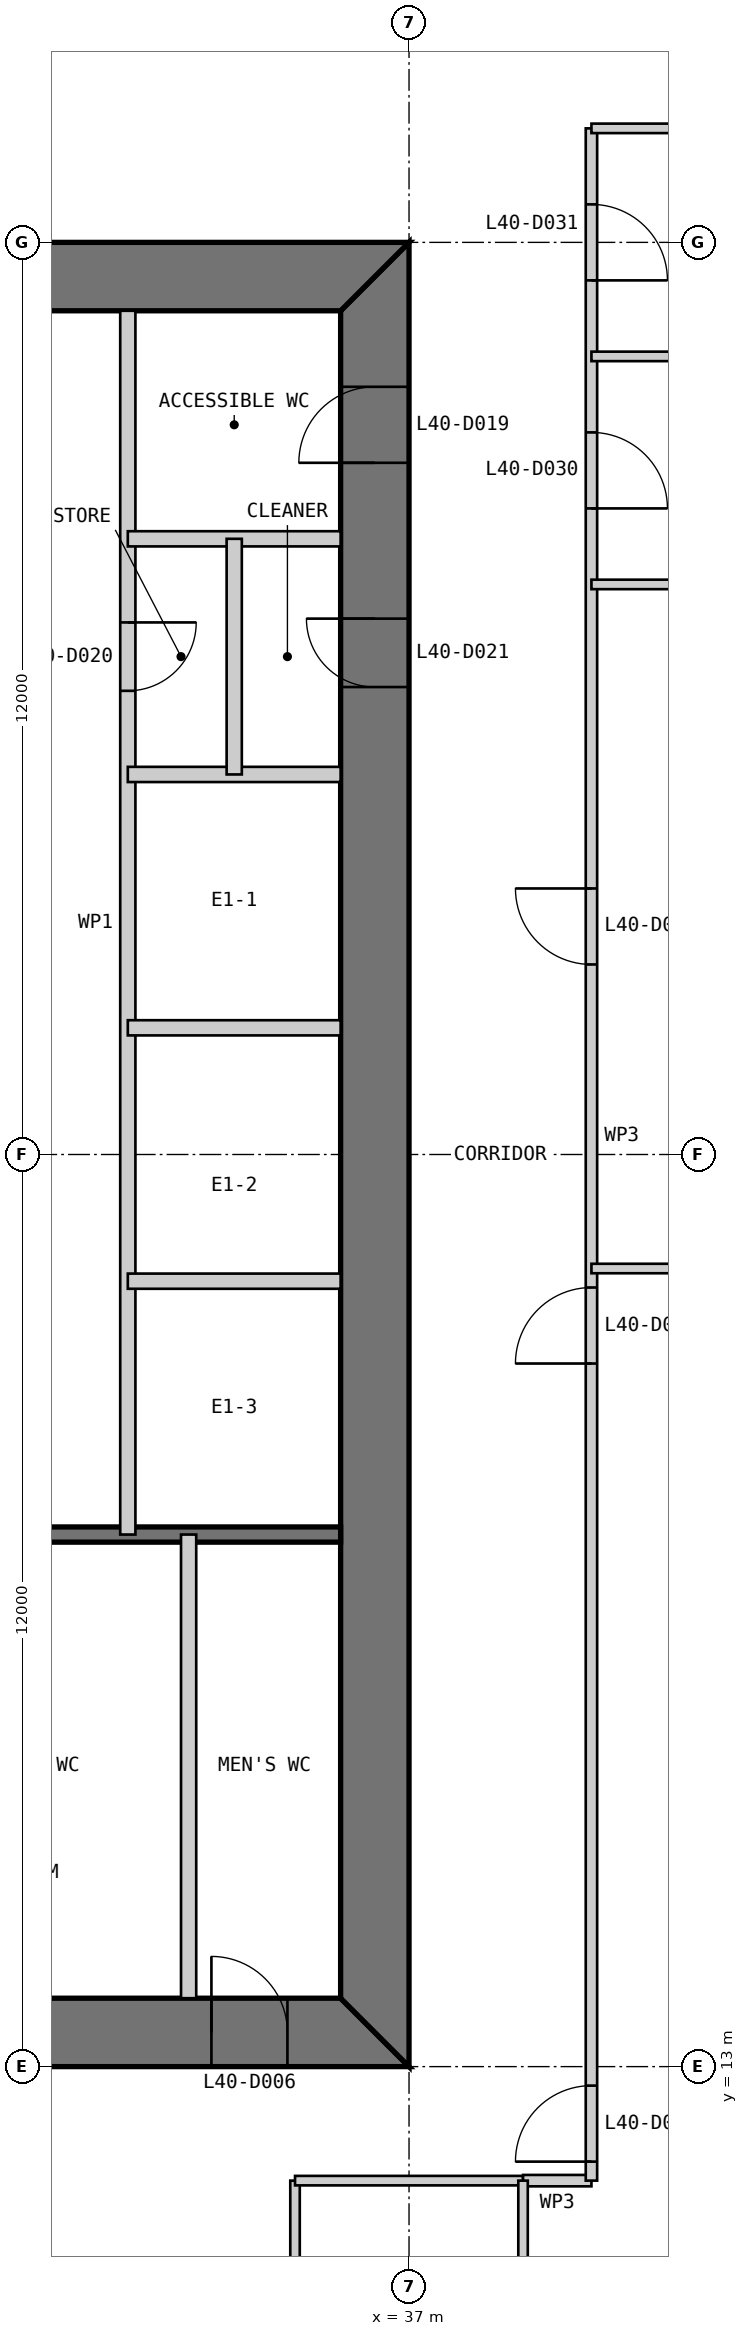
"""IFC4 building model, lengths in metres.
Left out: names, types, materials, properties, quantities, classifications, styles, units other than length and angle.
Written with IfcOpenShell. Run it as: python <this file> out.ifc"""

import sys

from ifc_helpers import new_model, si_unit, direction, frame, frame_2d, origin, place, context, subcontext, project, spatial, polyline, rectangle, outline, extrude, element, fill, save


model = new_model("IFC4")
c1 = context("Model", 3, precision=1e-05, world=origin(), true_north=direction((0.0, 1.0)))
c2 = subcontext(c1, "Body", "Model", "MODEL_VIEW")
j1 = project(units=[si_unit("LENGTHUNIT", "METRE"), si_unit("PLANEANGLEUNIT", "RADIAN")], contexts=[c1])
p1 = place(None, origin())
s1 = spatial("IfcSite", under=j1, at=p1, CompositionType="ELEMENT")
p2 = place(p1, origin())
s2 = spatial("IfcBuilding", under=s1, at=p2, CompositionType="ELEMENT")
p3 = place(p2, frame((0.0, 0.0, 173.8)))
s3 = spatial("IfcBuildingStorey", under=s2, at=p3, CompositionType="ELEMENT", Elevation=173.8)
p4 = place(p3, frame((13.0, 13.45, 0.0), z_axis=(0.0, 0.0, 1.0), x_axis=(1.0, 0.0, 0.0)))
e1 = element("IfcWall", 1, at=p4, inside=s3, PredefinedType="SHEAR", context=c2, shape_type="SweptSolid", body=[
    extrude(outline(polyline([(0.0, -0.45), (24.0, -0.45), (23.1, 0.45), (0.9, 0.45), (0.0, -0.45)])), origin(), (0.0, 0.0, 1.0), 4.0),
])
p5 = place(p4, frame((4.9, 0.0, 0.0)))
e2 = element("IfcOpeningElement", 2, at=p5, cuts=e1, PredefinedType="OPENING", context=c2, shape_type="SweptSolid", body=[
    extrude(rectangle(XDim=1.0, YDim=2.2, at=frame_2d((0.5, 1.1))), frame((0.0, 0.46, 0.0), z_axis=(0.0, -1.0, 0.0), x_axis=(1.0, 0.0, 0.0)), (0.0, 0.0, 1.0), 0.92),
])
p6 = place(p4, frame((8.9, 0.0, 0.0)))
e3 = element("IfcOpeningElement", 3, at=p6, cuts=e1, PredefinedType="OPENING", context=c2, shape_type="SweptSolid", body=[
    extrude(rectangle(XDim=1.1, YDim=2.2, at=frame_2d((0.55, 1.1))), frame((0.0, 0.46, 0.0), z_axis=(0.0, -1.0, 0.0), x_axis=(1.0, 0.0, 0.0)), (0.0, 0.0, 1.0), 0.92),
])
p7 = place(p4, frame((15.05, 0.0, 0.0)))
e4 = element("IfcOpeningElement", 4, at=p7, cuts=e1, PredefinedType="OPENING", context=c2, shape_type="SweptSolid", body=[
    extrude(rectangle(XDim=0.9, YDim=2.2, at=frame_2d((0.45, 1.1))), frame((0.0, 0.46, 0.0), z_axis=(0.0, -1.0, 0.0), x_axis=(1.0, 0.0, 0.0)), (0.0, 0.0, 1.0), 0.92),
])
p8 = place(p4, frame((17.9, 0.0, 0.0)))
e5 = element("IfcOpeningElement", 5, at=p8, cuts=e1, PredefinedType="OPENING", context=c2, shape_type="SweptSolid", body=[
    extrude(rectangle(XDim=1.0, YDim=2.2, at=frame_2d((0.5, 1.1))), frame((0.0, 0.46, 0.0), z_axis=(0.0, -1.0, 0.0), x_axis=(1.0, 0.0, 0.0)), (0.0, 0.0, 1.0), 0.92),
])
p9 = place(p4, frame((21.4, 0.0, 0.0)))
e6 = element("IfcOpeningElement", 6, at=p9, cuts=e1, PredefinedType="OPENING", context=c2, shape_type="SweptSolid", body=[
    extrude(rectangle(XDim=1.0, YDim=2.2, at=frame_2d((0.5, 1.1))), frame((0.0, 0.46, 0.0), z_axis=(0.0, -1.0, 0.0), x_axis=(1.0, 0.0, 0.0)), (0.0, 0.0, 1.0), 0.92),
])
p10 = place(p3, frame((36.55, 13.9, 0.0), z_axis=(0.0, 0.0, 1.0), x_axis=(0.0, 1.0, 0.0)))
e7 = element("IfcWall", 7, at=p10, inside=s3, PredefinedType="SHEAR", context=c2, shape_type="SweptSolid", body=[
    extrude(outline(polyline([(-0.9, -0.45), (23.1, -0.45), (22.2, 0.45), (0.0, 0.45), (-0.9, -0.45)])), origin(), (0.0, 0.0, 1.0), 4.0),
])
p11 = place(p10, frame((20.2, 0.0, 0.0)))
e8 = element("IfcOpeningElement", 8, at=p11, cuts=e7, PredefinedType="OPENING", context=c2, shape_type="SweptSolid", body=[
    extrude(rectangle(XDim=1.0, YDim=2.2, at=frame_2d((0.5, 1.1))), frame((0.0, 0.46, 0.0), z_axis=(0.0, -1.0, 0.0), x_axis=(1.0, 0.0, 0.0)), (0.0, 0.0, 1.0), 0.92),
])
p12 = place(p10, frame((17.25, 0.0, 0.0)))
e9 = element("IfcOpeningElement", 9, at=p12, cuts=e7, PredefinedType="OPENING", context=c2, shape_type="SweptSolid", body=[
    extrude(rectangle(XDim=0.9, YDim=2.2, at=frame_2d((0.45, 1.1))), frame((0.0, 0.46, 0.0), z_axis=(0.0, -1.0, 0.0), x_axis=(1.0, 0.0, 0.0)), (0.0, 0.0, 1.0), 0.92),
])
p13 = place(p3, frame((37.0, 36.55, 0.0), z_axis=(0.0, 0.0, 1.0), x_axis=(-1.0, 0.0, 0.0)))
e10 = element("IfcWall", 10, at=p13, inside=s3, PredefinedType="SHEAR", context=c2, shape_type="SweptSolid", body=[
    extrude(outline(polyline([(0.0, -0.45), (24.0, -0.45), (23.1, 0.45), (0.9, 0.45), (0.0, -0.45)])), origin(), (0.0, 0.0, 1.0), 4.0),
])
p14 = place(p13, frame((4.9, 0.0, 0.0)))
e11 = element("IfcOpeningElement", 11, at=p14, cuts=e10, PredefinedType="OPENING", context=c2, shape_type="SweptSolid", body=[
    extrude(rectangle(XDim=1.0, YDim=2.2, at=frame_2d((0.5, 1.1))), frame((0.0, 0.46, 0.0), z_axis=(0.0, -1.0, 0.0), x_axis=(1.0, 0.0, 0.0)), (0.0, 0.0, 1.0), 0.92),
])
p15 = place(p13, frame((8.9, 0.0, 0.0)))
e12 = element("IfcOpeningElement", 12, at=p15, cuts=e10, PredefinedType="OPENING", context=c2, shape_type="SweptSolid", body=[
    extrude(rectangle(XDim=1.1, YDim=2.2, at=frame_2d((0.55, 1.1))), frame((0.0, 0.46, 0.0), z_axis=(0.0, -1.0, 0.0), x_axis=(1.0, 0.0, 0.0)), (0.0, 0.0, 1.0), 0.92),
])
p16 = place(p13, frame((15.05, 0.0, 0.0)))
e13 = element("IfcOpeningElement", 13, at=p16, cuts=e10, PredefinedType="OPENING", context=c2, shape_type="SweptSolid", body=[
    extrude(rectangle(XDim=0.9, YDim=2.2, at=frame_2d((0.45, 1.1))), frame((0.0, 0.46, 0.0), z_axis=(0.0, -1.0, 0.0), x_axis=(1.0, 0.0, 0.0)), (0.0, 0.0, 1.0), 0.92),
])
p17 = place(p13, frame((17.9, 0.0, 0.0)))
e14 = element("IfcOpeningElement", 14, at=p17, cuts=e10, PredefinedType="OPENING", context=c2, shape_type="SweptSolid", body=[
    extrude(rectangle(XDim=1.0, YDim=2.2, at=frame_2d((0.5, 1.1))), frame((0.0, 0.46, 0.0), z_axis=(0.0, -1.0, 0.0), x_axis=(1.0, 0.0, 0.0)), (0.0, 0.0, 1.0), 0.92),
])
p18 = place(p13, frame((21.4, 0.0, 0.0)))
e15 = element("IfcOpeningElement", 15, at=p18, cuts=e10, PredefinedType="OPENING", context=c2, shape_type="SweptSolid", body=[
    extrude(rectangle(XDim=1.0, YDim=2.2, at=frame_2d((0.5, 1.1))), frame((0.0, 0.46, 0.0), z_axis=(0.0, -1.0, 0.0), x_axis=(1.0, 0.0, 0.0)), (0.0, 0.0, 1.0), 0.92),
])
p19 = place(p3, frame((20.3, 20.0, 0.0), z_axis=(0.0, 0.0, 1.0), x_axis=(1.0, 0.0, 0.0)))
e16 = element("IfcWall", 16, at=p19, inside=s3, PredefinedType="SOLIDWALL", context=c2, shape_type="SweptSolid", body=[
    extrude(rectangle(XDim=15.8, YDim=0.2, at=frame_2d((7.9, 0.0))), origin(), (0.0, 0.0, 1.0), 3.8),
])
p20 = place(p3, frame((34.1, 13.9, 0.0), z_axis=(0.0, 0.0, 1.0), x_axis=(0.0, 1.0, 0.0)))
e17 = element("IfcWall", 17, at=p20, inside=s3, PredefinedType="PARTITIONING", context=c2, shape_type="SweptSolid", body=[
    extrude(rectangle(XDim=6.1, YDim=0.2, at=frame_2d((3.05, 0.0))), origin(), (0.0, 0.0, 1.0), 3.8),
])
p21 = place(p3, frame((33.3, 36.1, 0.0), z_axis=(0.0, 0.0, 1.0), x_axis=(0.0, -1.0, 0.0)))
e18 = element("IfcWall", 18, at=p21, inside=s3, PredefinedType="PARTITIONING", context=c2, shape_type="SweptSolid", body=[
    extrude(rectangle(XDim=16.1, YDim=0.2, at=frame_2d((8.05, 0.0))), origin(), (0.0, 0.0, 1.0), 3.8),
])
p22 = place(p21, frame((4.1, 0.0, 0.0)))
e19 = element("IfcOpeningElement", 19, at=p22, cuts=e18, PredefinedType="OPENING", context=c2, shape_type="SweptSolid", body=[
    extrude(rectangle(XDim=0.9, YDim=2.2, at=frame_2d((0.45, 1.1))), frame((0.0, 0.11, 0.0), z_axis=(0.0, -1.0, 0.0), x_axis=(1.0, 0.0, 0.0)), (0.0, 0.0, 1.0), 0.22),
])
for number, where, z_axis, x_axis in (
    (20, (36.1, 30.0, 0.0), (0.0, 0.0, 1.0), (-1.0, 0.0, 0.0)),
    (21, (36.1, 26.667, 0.0), (0.0, 0.0, 1.0), (-1.0, 0.0, 0.0)),
    (22, (36.1, 23.333, 0.0), (0.0, 0.0, 1.0), (-1.0, 0.0, 0.0)),
    (23, (36.1, 33.1, 0.0), (0.0, 0.0, 1.0), (-1.0, 0.0, 0.0)),
):
    element("IfcWall", number, at=place(p3, frame(where, z_axis=z_axis, x_axis=x_axis)), inside=s3, PredefinedType="PARTITIONING", context=c2, shape_type="SweptSolid", body=[
        extrude(rectangle(XDim=2.8, YDim=0.2, at=frame_2d((1.4, 0.0))), origin(), (0.0, 0.0, 1.0), 3.8),
    ])
p23 = place(p3, frame((34.7, 33.1, 0.0), z_axis=(0.0, 0.0, 1.0), x_axis=(0.0, -1.0, 0.0)))
e24 = element("IfcWall", 24, at=p23, inside=s3, PredefinedType="PARTITIONING", context=c2, shape_type="SweptSolid", body=[
    extrude(rectangle(XDim=3.1, YDim=0.2, at=frame_2d((1.55, 0.0))), origin(), (0.0, 0.0, 1.0), 3.8),
])
p24 = place(p3, frame((35.5, 4.0, 0.0), z_axis=(0.0, 0.0, 1.0), x_axis=(0.0, 1.0, 0.0)))
e25 = element("IfcWall", 25, at=p24, inside=s3, PredefinedType="PARTITIONING", context=c2, shape_type="SweptSolid", body=[
    extrude(rectangle(XDim=7.5, YDim=0.125, at=frame_2d((3.75, 0.0))), origin(), (0.0, 0.0, 1.0), 3.85),
])
p25 = place(p24, frame((3.3, 0.0, 0.0)))
e26 = element("IfcOpeningElement", 26, at=p25, cuts=e25, PredefinedType="OPENING", context=c2, shape_type="SweptSolid", body=[
    extrude(rectangle(XDim=0.9, YDim=2.2, at=frame_2d((0.45, 1.1))), frame((0.0, 0.073, 0.0), z_axis=(0.0, -1.0, 0.0), x_axis=(1.0, 0.0, 0.0)), (0.0, 0.0, 1.0), 0.145),
])
p26 = place(p3, frame((35.5, 11.5, 0.0), z_axis=(0.0, 0.0, 1.0), x_axis=(1.0, 0.0, 0.0)))
e27 = element("IfcWall", 27, at=p26, inside=s3, PredefinedType="PARTITIONING", context=c2, shape_type="SweptSolid", body=[
    extrude(rectangle(XDim=3.0, YDim=0.125, at=frame_2d((1.5, 0.0))), origin(), (0.0, 0.0, 1.0), 3.85),
])
p27 = place(p3, frame((38.5, 11.5, 0.0), z_axis=(0.0, 0.0, 1.0), x_axis=(1.0, 0.0, 0.0)))
e28 = element("IfcWall", 28, at=p27, inside=s3, PredefinedType="PARTITIONING", context=c2, shape_type="SweptSolid", body=[
    extrude(rectangle(XDim=0.9, YDim=0.15, at=frame_2d((0.45, 0.0))), origin(), (0.0, 0.0, 1.0), 3.85),
])
p28 = place(p3, frame((39.4, 11.5, 0.0), z_axis=(0.0, 0.0, 1.0), x_axis=(0.0, 1.0, 0.0)))
e29 = element("IfcWall", 29, at=p28, inside=s3, PredefinedType="PARTITIONING", context=c2, shape_type="SweptSolid", body=[
    extrude(rectangle(XDim=27.0, YDim=0.15, at=frame_2d((13.5, 0.0))), origin(), (0.0, 0.0, 1.0), 3.85),
])
p29 = place(p28, frame((16.0, 0.0, 0.0)))
e30 = element("IfcOpeningElement", 30, at=p29, cuts=e29, PredefinedType="OPENING", context=c2, shape_type="SweptSolid", body=[
    extrude(rectangle(XDim=1.0, YDim=2.2, at=frame_2d((0.5, 1.1))), frame((0.0, 0.085, 0.0), z_axis=(0.0, -1.0, 0.0), x_axis=(1.0, 0.0, 0.0)), (0.0, 0.0, 1.0), 0.17),
])
p30 = place(p28, frame((0.25, 0.0, 0.0)))
e31 = element("IfcOpeningElement", 31, at=p30, cuts=e29, PredefinedType="OPENING", context=c2, shape_type="SweptSolid", body=[
    extrude(rectangle(XDim=1.0, YDim=2.2, at=frame_2d((0.5, 1.1))), frame((0.0, 0.085, 0.0), z_axis=(0.0, -1.0, 0.0), x_axis=(1.0, 0.0, 0.0)), (0.0, 0.0, 1.0), 0.17),
])
p31 = place(p28, frame((10.75, 0.0, 0.0)))
e32 = element("IfcOpeningElement", 32, at=p31, cuts=e29, PredefinedType="OPENING", context=c2, shape_type="SweptSolid", body=[
    extrude(rectangle(XDim=1.0, YDim=2.2, at=frame_2d((0.5, 1.1))), frame((0.0, 0.085, 0.0), z_axis=(0.0, -1.0, 0.0), x_axis=(1.0, 0.0, 0.0)), (0.0, 0.0, 1.0), 0.17),
])
p32 = place(p28, frame((22.0, 0.0, 0.0)))
e33 = element("IfcOpeningElement", 33, at=p32, cuts=e29, PredefinedType="OPENING", context=c2, shape_type="SweptSolid", body=[
    extrude(rectangle(XDim=1.0, YDim=2.2, at=frame_2d((0.5, 1.1))), frame((0.0, 0.085, 0.0), z_axis=(0.0, -1.0, 0.0), x_axis=(1.0, 0.0, 0.0)), (0.0, 0.0, 1.0), 0.17),
])
p33 = place(p28, frame((25.0, 0.0, 0.0)))
e34 = element("IfcOpeningElement", 34, at=p33, cuts=e29, PredefinedType="OPENING", context=c2, shape_type="SweptSolid", body=[
    extrude(rectangle(XDim=1.0, YDim=2.2, at=frame_2d((0.5, 1.1))), frame((0.0, 0.085, 0.0), z_axis=(0.0, -1.0, 0.0), x_axis=(1.0, 0.0, 0.0)), (0.0, 0.0, 1.0), 0.17),
])
p34 = place(p3, frame((38.5, 0.15, 0.0), z_axis=(0.0, 0.0, 1.0), x_axis=(0.0, 1.0, 0.0)))
e35 = element("IfcWall", 35, at=p34, inside=s3, PredefinedType="PARTITIONING", context=c2, shape_type="SweptSolid", body=[
    extrude(rectangle(XDim=11.35, YDim=0.125, at=frame_2d((5.675, 0.0))), origin(), (0.0, 0.0, 1.0), 3.85),
])
p35 = place(p3, frame((46.0, 23.5, 0.0), z_axis=(0.0, 0.0, 1.0), x_axis=(-1.0, 0.0, 0.0)))
e36 = element("IfcWall", 36, at=p35, inside=s3, PredefinedType="PARTITIONING", context=c2, shape_type="SweptSolid", body=[
    extrude(rectangle(XDim=6.6, YDim=0.125, at=frame_2d((3.3, 0.0))), origin(), (0.0, 0.0, 1.0), 3.85),
])
p36 = place(p3, frame((49.85, 32.5, 0.0), z_axis=(0.0, 0.0, 1.0), x_axis=(-1.0, 0.0, 0.0)))
e37 = element("IfcWall", 37, at=p36, inside=s3, PredefinedType="PARTITIONING", context=c2, shape_type="SweptSolid", body=[
    extrude(rectangle(XDim=10.45, YDim=0.125, at=frame_2d((5.225, 0.0))), origin(), (0.0, 0.0, 1.0), 3.85),
])
p37 = place(p3, frame((46.0, 35.5, 0.0), z_axis=(0.0, 0.0, 1.0), x_axis=(-1.0, 0.0, 0.0)))
e38 = element("IfcWall", 38, at=p37, inside=s3, PredefinedType="PARTITIONING", context=c2, shape_type="SweptSolid", body=[
    extrude(rectangle(XDim=6.6, YDim=0.125, at=frame_2d((3.3, 0.0))), origin(), (0.0, 0.0, 1.0), 3.85),
])
p38 = place(p3, frame((49.85, 38.5, 0.0), z_axis=(0.0, 0.0, 1.0), x_axis=(-1.0, 0.0, 0.0)))
e39 = element("IfcWall", 39, at=p38, inside=s3, PredefinedType="PARTITIONING", context=c2, shape_type="SweptSolid", body=[
    extrude(rectangle(XDim=10.45, YDim=0.125, at=frame_2d((5.225, 0.0))), origin(), (0.0, 0.0, 1.0), 3.85),
])
p39 = place(p9, origin())
e40 = element("IfcDoor", 40, at=p39, inside=s3, OperationType="SINGLE_SWING_LEFT", PredefinedType="DOOR", context=c2, shape_type="SweptSolid", body=[
    extrude(rectangle(XDim=1.0, YDim=2.2, at=frame_2d((0.5, 1.1))), frame((0.0, 0.025, 0.0), z_axis=(0.0, -1.0, 0.0), x_axis=(1.0, 0.0, 0.0)), (0.0, 0.0, 1.0), 0.05),
    extrude(outline(polyline([(0.0, 0.0), (0.04, 0.0), (0.04, 2.16), (0.96, 2.16), (0.96, 0.0), (1.0, 0.0), (1.0, 2.2), (0.0, 2.2), (0.0, 0.0)])), frame((0.0, 0.3, 0.0), z_axis=(0.0, -1.0, 0.0), x_axis=(1.0, 0.0, 0.0)), (0.0, 0.0, 1.0), 0.6),
])
fill(e6, e40)
p40 = place(p11, origin())
e41 = element("IfcDoor", 41, at=p40, inside=s3, OperationType="SINGLE_SWING_LEFT", PredefinedType="DOOR", context=c2, shape_type="SweptSolid", body=[
    extrude(rectangle(XDim=1.0, YDim=2.2, at=frame_2d((0.5, 1.1))), frame((0.0, 0.025, 0.0), z_axis=(0.0, -1.0, 0.0), x_axis=(1.0, 0.0, 0.0)), (0.0, 0.0, 1.0), 0.05),
    extrude(outline(polyline([(0.0, 0.0), (0.04, 0.0), (0.04, 2.16), (0.96, 2.16), (0.96, 0.0), (1.0, 0.0), (1.0, 2.2), (0.0, 2.2), (0.0, 0.0)])), frame((0.0, 0.3, 0.0), z_axis=(0.0, -1.0, 0.0), x_axis=(1.0, 0.0, 0.0)), (0.0, 0.0, 1.0), 0.6),
])
fill(e8, e41)
p41 = place(p22, origin())
e42 = element("IfcDoor", 42, at=p41, inside=s3, OperationType="SINGLE_SWING_LEFT", PredefinedType="DOOR", context=c2, shape_type="SweptSolid", body=[
    extrude(rectangle(XDim=0.9, YDim=2.2, at=frame_2d((0.45, 1.1))), frame((0.0, 0.025, 0.0), z_axis=(0.0, -1.0, 0.0), x_axis=(1.0, 0.0, 0.0)), (0.0, 0.0, 1.0), 0.05),
])
fill(e19, e42)
p42 = place(p12, origin())
e43 = element("IfcDoor", 43, at=p42, inside=s3, OperationType="SINGLE_SWING_RIGHT", PredefinedType="DOOR", context=c2, shape_type="SweptSolid", body=[
    extrude(rectangle(XDim=0.9, YDim=2.2, at=frame_2d((0.45, 1.1))), frame((0.0, 0.025, 0.0), z_axis=(0.0, -1.0, 0.0), x_axis=(1.0, 0.0, 0.0)), (0.0, 0.0, 1.0), 0.05),
    extrude(outline(polyline([(0.0, 0.0), (0.04, 0.0), (0.04, 2.16), (0.86, 2.16), (0.86, 0.0), (0.9, 0.0), (0.9, 2.2), (0.0, 2.2), (0.0, 0.0)])), frame((0.0, 0.3, 0.0), z_axis=(0.0, -1.0, 0.0), x_axis=(1.0, 0.0, 0.0)), (0.0, 0.0, 1.0), 0.6),
])
fill(e9, e43)
p43 = place(p29, origin())
e44 = element("IfcDoor", 44, at=p43, inside=s3, OperationType="SINGLE_SWING_RIGHT", PredefinedType="DOOR", context=c2, shape_type="SweptSolid", body=[
    extrude(rectangle(XDim=1.0, YDim=2.2, at=frame_2d((0.5, 1.1))), frame((0.0, 0.025, 0.0), z_axis=(0.0, -1.0, 0.0), x_axis=(1.0, 0.0, 0.0)), (0.0, 0.0, 1.0), 0.05),
])
fill(e30, e44)
p44 = place(p30, origin())
e45 = element("IfcDoor", 45, at=p44, inside=s3, OperationType="SINGLE_SWING_LEFT", PredefinedType="DOOR", context=c2, shape_type="SweptSolid", body=[
    extrude(rectangle(XDim=1.0, YDim=2.2, at=frame_2d((0.5, 1.1))), frame((0.0, 0.025, 0.0), z_axis=(0.0, -1.0, 0.0), x_axis=(1.0, 0.0, 0.0)), (0.0, 0.0, 1.0), 0.05),
])
fill(e31, e45)
p45 = place(p31, origin())
e46 = element("IfcDoor", 46, at=p45, inside=s3, OperationType="SINGLE_SWING_LEFT", PredefinedType="DOOR", context=c2, shape_type="SweptSolid", body=[
    extrude(rectangle(XDim=1.0, YDim=2.2, at=frame_2d((0.5, 1.1))), frame((0.0, 0.025, 0.0), z_axis=(0.0, -1.0, 0.0), x_axis=(1.0, 0.0, 0.0)), (0.0, 0.0, 1.0), 0.05),
])
fill(e32, e46)
p46 = place(p32, frame((1.0, 0.0, 0.0), z_axis=(0.0, 0.0, 1.0), x_axis=(-1.0, 0.0, 0.0)))
e47 = element("IfcDoor", 47, at=p46, inside=s3, OperationType="SINGLE_SWING_RIGHT", PredefinedType="DOOR", context=c2, shape_type="SweptSolid", body=[
    extrude(rectangle(XDim=1.0, YDim=2.2, at=frame_2d((0.5, 1.1))), frame((0.0, 0.025, 0.0), z_axis=(0.0, -1.0, 0.0), x_axis=(1.0, 0.0, 0.0)), (0.0, 0.0, 1.0), 0.05),
])
fill(e33, e47)
p47 = place(p33, frame((1.0, 0.0, 0.0), z_axis=(0.0, 0.0, 1.0), x_axis=(-1.0, 0.0, 0.0)))
e48 = element("IfcDoor", 48, at=p47, inside=s3, OperationType="SINGLE_SWING_RIGHT", PredefinedType="DOOR", context=c2, shape_type="SweptSolid", body=[
    extrude(rectangle(XDim=1.0, YDim=2.2, at=frame_2d((0.5, 1.1))), frame((0.0, 0.025, 0.0), z_axis=(0.0, -1.0, 0.0), x_axis=(1.0, 0.0, 0.0)), (0.0, 0.0, 1.0), 0.05),
])
fill(e34, e48)
save(model, sys.argv[1])
